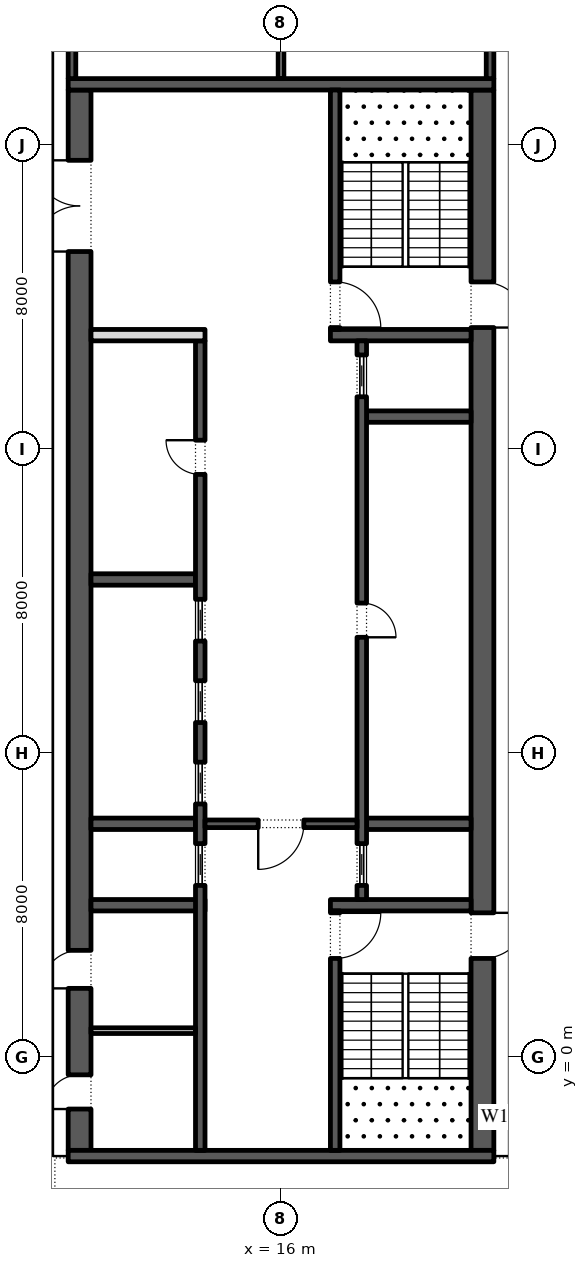
"""IFC4 building model, lengths in metres.
Left out: names, types, materials, properties, quantities, classifications, styles, units other than length and angle.
Written with IfcOpenShell. Run it as: python <this file> out.ifc"""

import sys

from ifc_helpers import new_model, si_unit, direction, frame, frame_2d, origin, place, context, subcontext, project, spatial, rectangle, extrude, element, fill, save


model = new_model("IFC4")
c1 = context("Model", 3, precision=1e-05, world=origin(), true_north=direction((0.0, 1.0)))
c2 = subcontext(c1, "Body", "Model", "MODEL_VIEW")
j1 = project(units=[si_unit("LENGTHUNIT", "METRE"), si_unit("PLANEANGLEUNIT", "RADIAN")], contexts=[c1])
p1 = place(None, origin())
s1 = spatial("IfcSite", under=j1, at=p1, CompositionType="ELEMENT")
p2 = place(p1, origin())
s2 = spatial("IfcBuilding", under=s1, at=p2, CompositionType="ELEMENT")
p3 = place(p2, frame((0.0, 0.0, 247.2)))
s3 = spatial("IfcBuildingStorey", under=s2, at=p3, CompositionType="ELEMENT", Elevation=247.2)
p4 = place(p3, frame((21.359, -11.678, 0.0), z_axis=(0.0, 0.0, 1.0), x_axis=(0.224949198343, 0.974370493275, 0.0)))
e1 = element("IfcWall", 1, at=p4, inside=s3, PredefinedType="STANDARD", context=c2, shape_type="SweptSolid", body=[
    extrude(rectangle(XDim=49.5, YDim=0.3, at=frame_2d((24.75, 0.0))), origin(), (0.0, 0.0, 1.0), 4.0),
])
p5 = place(p4, frame((1.157, 0.0, 0.45)))
e2 = element("IfcOpeningElement", 2, at=p5, cuts=e1, PredefinedType="OPENING", context=c2, shape_type="SweptSolid", body=[
    extrude(rectangle(XDim=4.5, YDim=3.05, at=frame_2d((2.25, 1.525))), frame((0.0, 0.16, 0.0), z_axis=(0.0, -1.0, 0.0), x_axis=(1.0, 0.0, 0.0)), (0.0, 0.0, 1.0), 0.32),
])
p6 = place(p4, frame((8.121, 0.0, 0.45)))
e3 = element("IfcOpeningElement", 3, at=p6, cuts=e1, PredefinedType="OPENING", context=c2, shape_type="SweptSolid", body=[
    extrude(rectangle(XDim=4.5, YDim=3.05, at=frame_2d((2.25, 1.525))), frame((0.0, 0.16, 0.0), z_axis=(0.0, -1.0, 0.0), x_axis=(1.0, 0.0, 0.0)), (0.0, 0.0, 1.0), 0.32),
])
p7 = place(p4, frame((15.236, 0.0, 0.45)))
e4 = element("IfcOpeningElement", 4, at=p7, cuts=e1, PredefinedType="OPENING", context=c2, shape_type="SweptSolid", body=[
    extrude(rectangle(XDim=4.5, YDim=3.05, at=frame_2d((2.25, 1.525))), frame((0.0, 0.16, 0.0), z_axis=(0.0, -1.0, 0.0), x_axis=(1.0, 0.0, 0.0)), (0.0, 0.0, 1.0), 0.32),
])
p8 = place(p4, frame((22.35, 0.0, 0.45)))
e5 = element("IfcOpeningElement", 5, at=p8, cuts=e1, PredefinedType="OPENING", context=c2, shape_type="SweptSolid", body=[
    extrude(rectangle(XDim=4.5, YDim=3.05, at=frame_2d((2.25, 1.525))), frame((0.0, 0.16, 0.0), z_axis=(0.0, -1.0, 0.0), x_axis=(1.0, 0.0, 0.0)), (0.0, 0.0, 1.0), 0.32),
])
p9 = place(p4, frame((29.464, 0.0, 0.45)))
e6 = element("IfcOpeningElement", 6, at=p9, cuts=e1, PredefinedType="OPENING", context=c2, shape_type="SweptSolid", body=[
    extrude(rectangle(XDim=4.5, YDim=2.95, at=frame_2d((2.25, 1.475))), frame((0.0, 0.16, 0.0), z_axis=(0.0, -1.0, 0.0), x_axis=(1.0, 0.0, 0.0)), (0.0, 0.0, 1.0), 0.32),
])
p10 = place(p4, frame((37.628, 0.0, 0.0)))
e7 = element("IfcOpeningElement", 7, at=p10, cuts=e1, PredefinedType="OPENING", context=c2, shape_type="SweptSolid", body=[
    extrude(rectangle(XDim=2.4, YDim=3.325, at=frame_2d((1.2, 1.663))), frame((0.0, 0.16, 0.0), z_axis=(0.0, -1.0, 0.0), x_axis=(1.0, 0.0, 0.0)), (0.0, 0.0, 1.0), 0.32),
])
p11 = place(p4, frame((43.693, 0.0, 0.45)))
e8 = element("IfcOpeningElement", 8, at=p11, cuts=e1, PredefinedType="OPENING", context=c2, shape_type="SweptSolid", body=[
    extrude(rectangle(XDim=4.5, YDim=3.05, at=frame_2d((2.25, 1.525))), frame((0.0, 0.16, 0.0), z_axis=(0.0, -1.0, 0.0), x_axis=(1.0, 0.0, 0.0)), (0.0, 0.0, 1.0), 0.32),
])
p12 = place(p3, frame((21.3, -2.45, 0.0), z_axis=(0.0, 0.0, 1.0), x_axis=(0.0, 1.0, 0.0)))
e9 = element("IfcWall", 9, at=p12, inside=s3, PredefinedType="SHEAR", context=c2, shape_type="SweptSolid", body=[
    extrude(rectangle(XDim=27.9, YDim=0.6, at=frame_2d((13.95, 0.0))), origin(), (0.0, 0.0, 1.0), 4.0),
])
p13 = place(p12, frame((5.05, 0.0, 0.0)))
e10 = element("IfcOpeningElement", 10, at=p13, cuts=e9, PredefinedType="OPENING", context=c2, shape_type="SweptSolid", body=[
    extrude(rectangle(XDim=1.2, YDim=2.1, at=frame_2d((0.6, 1.05))), frame((0.0, 0.31, 0.0), z_axis=(0.0, -1.0, 0.0), x_axis=(1.0, 0.0, 0.0)), (0.0, 0.0, 1.0), 0.62),
])
p14 = place(p12, frame((21.65, 0.0, 0.0)))
e11 = element("IfcOpeningElement", 11, at=p14, cuts=e9, PredefinedType="OPENING", context=c2, shape_type="SweptSolid", body=[
    extrude(rectangle(XDim=1.2, YDim=2.1, at=frame_2d((0.6, 1.05))), frame((0.0, 0.31, 0.0), z_axis=(0.0, -1.0, 0.0), x_axis=(1.0, 0.0, 0.0)), (0.0, 0.0, 1.0), 0.62),
])
p15 = place(p3, frame((10.7, -2.45, 0.0), z_axis=(0.0, 0.0, 1.0), x_axis=(0.0, 1.0, 0.0)))
e12 = element("IfcWall", 12, at=p15, inside=s3, PredefinedType="SHEAR", context=c2, shape_type="SweptSolid", body=[
    extrude(rectangle(XDim=27.9, YDim=0.6, at=frame_2d((13.95, 0.0))), origin(), (0.0, 0.0, 1.0), 4.0),
])
p16 = place(p15, frame((23.65, 0.0, 0.0)))
e13 = element("IfcOpeningElement", 13, at=p16, cuts=e12, PredefinedType="OPENING", context=c2, shape_type="SweptSolid", body=[
    extrude(rectangle(XDim=2.4, YDim=2.1, at=frame_2d((1.2, 1.05))), frame((0.0, 0.31, 0.0), z_axis=(0.0, -1.0, 0.0), x_axis=(1.0, 0.0, 0.0)), (0.0, 0.0, 1.0), 0.62),
])
p17 = place(p15, frame((1.087, 0.0, 0.0)))
e14 = element("IfcOpeningElement", 14, at=p17, cuts=e12, PredefinedType="OPENING", context=c2, shape_type="SweptSolid", body=[
    extrude(rectangle(XDim=0.9, YDim=2.1, at=frame_2d((0.45, 1.05))), frame((0.0, 0.31, 0.0), z_axis=(0.0, -1.0, 0.0), x_axis=(1.0, 0.0, 0.0)), (0.0, 0.0, 1.0), 0.62),
])
p18 = place(p15, frame((4.262, 0.0, 0.0)))
e15 = element("IfcOpeningElement", 15, at=p18, cuts=e12, PredefinedType="OPENING", context=c2, shape_type="SweptSolid", body=[
    extrude(rectangle(XDim=1.0, YDim=2.1, at=frame_2d((0.5, 1.05))), frame((0.0, 0.31, 0.0), z_axis=(0.0, -1.0, 0.0), x_axis=(1.0, 0.0, 0.0)), (0.0, 0.0, 1.0), 0.62),
])
for number, where, z_axis, x_axis in (
    (16, (10.4, -2.6, 0.0), (0.0, 0.0, 1.0), (1.0, 0.0, 0.0)),
    (17, (10.4, 25.6, 0.0), (0.0, 0.0, 1.0), (1.0, 0.0, 0.0)),
):
    element("IfcWall", number, at=place(p3, frame(where, z_axis=z_axis, x_axis=x_axis)), inside=s3, PredefinedType="SHEAR", context=c2, shape_type="SweptSolid", body=[
        extrude(rectangle(XDim=11.2, YDim=0.3, at=frame_2d((5.6, 0.0))), origin(), (0.0, 0.0, 1.0), 4.0),
    ])
p19 = place(p3, frame((17.3, 4.0, 0.0), z_axis=(0.0, 0.0, 1.0), x_axis=(1.0, 0.0, 0.0)))
e18 = element("IfcWall", 18, at=p19, inside=s3, PredefinedType="SHEAR", context=c2, shape_type="SweptSolid", body=[
    extrude(rectangle(XDim=3.7, YDim=0.3, at=frame_2d((1.85, 0.0))), origin(), (0.0, 0.0, 1.0), 4.0),
])
p20 = place(p3, frame((17.425, -2.45, 0.0), z_axis=(0.0, 0.0, 1.0), x_axis=(0.0, 1.0, 0.0)))
e19 = element("IfcWall", 19, at=p20, inside=s3, PredefinedType="SHEAR", context=c2, shape_type="SweptSolid", body=[
    extrude(rectangle(XDim=6.3, YDim=0.25, at=frame_2d((3.15, 0.0))), origin(), (0.0, 0.0, 1.0), 4.0),
])
p21 = place(p20, frame((5.05, 0.0, 0.0)))
e20 = element("IfcOpeningElement", 20, at=p21, cuts=e19, PredefinedType="OPENING", context=c2, shape_type="SweptSolid", body=[
    extrude(rectangle(XDim=1.2, YDim=2.1, at=frame_2d((0.6, 1.05))), frame((0.0, 0.135, 0.0), z_axis=(0.0, -1.0, 0.0), x_axis=(1.0, 0.0, 0.0)), (0.0, 0.0, 1.0), 0.27),
])
p22 = place(p3, frame((17.3, 19.0, 0.0), z_axis=(0.0, 0.0, 1.0), x_axis=(1.0, 0.0, 0.0)))
e21 = element("IfcWall", 21, at=p22, inside=s3, PredefinedType="SHEAR", context=c2, shape_type="SweptSolid", body=[
    extrude(rectangle(XDim=3.7, YDim=0.3, at=frame_2d((1.85, 0.0))), origin(), (0.0, 0.0, 1.0), 4.0),
])
p23 = place(p3, frame((17.425, 19.15, 0.0), z_axis=(0.0, 0.0, 1.0), x_axis=(0.0, 1.0, 0.0)))
e22 = element("IfcWall", 22, at=p23, inside=s3, PredefinedType="SHEAR", context=c2, shape_type="SweptSolid", body=[
    extrude(rectangle(XDim=6.3, YDim=0.25, at=frame_2d((3.15, 0.0))), origin(), (0.0, 0.0, 1.0), 4.0),
])
p24 = place(p23, frame((0.05, 0.0, 0.0)))
e23 = element("IfcOpeningElement", 23, at=p24, cuts=e22, PredefinedType="OPENING", context=c2, shape_type="SweptSolid", body=[
    extrude(rectangle(XDim=1.2, YDim=2.1, at=frame_2d((0.6, 1.05))), frame((0.0, 0.135, 0.0), z_axis=(0.0, -1.0, 0.0), x_axis=(1.0, 0.0, 0.0)), (0.0, 0.0, 1.0), 0.27),
])
for number, where, z_axis, x_axis in (
    (24, (18.25, 6.143, 0.0), (0.0, 0.0, 1.0), (1.0, 0.0, 0.0)),
    (25, (18.25, 16.857, 0.0), (0.0, 0.0, 1.0), (1.0, 0.0, 0.0)),
):
    element("IfcWall", number, at=place(p3, frame(where, z_axis=z_axis, x_axis=x_axis)), inside=s3, PredefinedType="SHEAR", context=c2, shape_type="SweptSolid", body=[
        extrude(rectangle(XDim=2.75, YDim=0.3, at=frame_2d((1.375, 0.0))), origin(), (0.0, 0.0, 1.0), 4.0),
    ])
p25 = place(p3, frame((18.125, 4.15, 0.0), z_axis=(0.0, 0.0, 1.0), x_axis=(0.0, 1.0, 0.0)))
e26 = element("IfcWall", 26, at=p25, inside=s3, PredefinedType="SHEAR", context=c2, shape_type="SweptSolid", body=[
    extrude(rectangle(XDim=14.7, YDim=0.25, at=frame_2d((7.35, 0.0))), origin(), (0.0, 0.0, 1.0), 4.0),
])
p26 = place(p25, frame((6.9, 0.0, 0.0)))
e27 = element("IfcOpeningElement", 27, at=p26, cuts=e26, PredefinedType="OPENING", context=c2, shape_type="SweptSolid", body=[
    extrude(rectangle(XDim=0.9, YDim=2.1, at=frame_2d((0.45, 1.05))), frame((0.0, 0.135, 0.0), z_axis=(0.0, -1.0, 0.0), x_axis=(1.0, 0.0, 0.0)), (0.0, 0.0, 1.0), 0.27),
])
p27 = place(p25, frame((0.371, 0.0, 0.0)))
e28 = element("IfcOpeningElement", 28, at=p27, cuts=e26, PredefinedType="OPENING", context=c2, shape_type="SweptSolid", body=[
    extrude(rectangle(XDim=1.1, YDim=2.1, at=frame_2d((0.55, 1.05))), frame((0.0, 0.135, 0.0), z_axis=(0.0, -1.0, 0.0), x_axis=(1.0, 0.0, 0.0)), (0.0, 0.0, 1.0), 0.27),
])
p28 = place(p25, frame((13.229, 0.0, 0.0)))
e29 = element("IfcOpeningElement", 29, at=p28, cuts=e26, PredefinedType="OPENING", context=c2, shape_type="SweptSolid", body=[
    extrude(rectangle(XDim=1.1, YDim=2.1, at=frame_2d((0.55, 1.05))), frame((0.0, 0.135, 0.0), z_axis=(0.0, -1.0, 0.0), x_axis=(1.0, 0.0, 0.0)), (0.0, 0.0, 1.0), 0.27),
])
p29 = place(p3, frame((11.0, 4.0, 0.0), z_axis=(0.0, 0.0, 1.0), x_axis=(1.0, 0.0, 0.0)))
e30 = element("IfcWall", 30, at=p29, inside=s3, PredefinedType="SHEAR", context=c2, shape_type="SweptSolid", body=[
    extrude(rectangle(XDim=3.0, YDim=0.3, at=frame_2d((1.5, 0.0))), origin(), (0.0, 0.0, 1.0), 4.0),
])
for number, where, z_axis, x_axis in (
    (31, (11.0, 6.143, 0.0), (0.0, 0.0, 1.0), (1.0, 0.0, 0.0)),
    (32, (11.0, 12.571, 0.0), (0.0, 0.0, 1.0), (1.0, 0.0, 0.0)),
):
    element("IfcWall", number, at=place(p3, frame(where, z_axis=z_axis, x_axis=x_axis)), inside=s3, PredefinedType="SHEAR", context=c2, shape_type="SweptSolid", body=[
        extrude(rectangle(XDim=2.75, YDim=0.3, at=frame_2d((1.375, 0.0))), origin(), (0.0, 0.0, 1.0), 4.0),
    ])
p30 = place(p3, frame((13.875, -2.45, 0.0), z_axis=(0.0, 0.0, 1.0), x_axis=(0.0, 1.0, 0.0)))
e33 = element("IfcWall", 33, at=p30, inside=s3, PredefinedType="SHEAR", context=c2, shape_type="SweptSolid", body=[
    extrude(rectangle(XDim=21.3, YDim=0.25, at=frame_2d((10.65, 0.0))), origin(), (0.0, 0.0, 1.0), 4.0),
])
p31 = place(p30, frame((17.786, 0.0, 0.0)))
e34 = element("IfcOpeningElement", 34, at=p31, cuts=e33, PredefinedType="OPENING", context=c2, shape_type="SweptSolid", body=[
    extrude(rectangle(XDim=0.9, YDim=2.1, at=frame_2d((0.45, 1.05))), frame((0.0, 0.135, 0.0), z_axis=(0.0, -1.0, 0.0), x_axis=(1.0, 0.0, 0.0)), (0.0, 0.0, 1.0), 0.27),
])
p32 = place(p30, frame((6.971, 0.0, 0.0)))
e35 = element("IfcOpeningElement", 35, at=p32, cuts=e33, PredefinedType="OPENING", context=c2, shape_type="SweptSolid", body=[
    extrude(rectangle(XDim=1.1, YDim=2.1, at=frame_2d((0.55, 1.05))), frame((0.0, 0.135, 0.0), z_axis=(0.0, -1.0, 0.0), x_axis=(1.0, 0.0, 0.0)), (0.0, 0.0, 1.0), 0.27),
])
p33 = place(p30, frame((9.114, 0.0, 0.0)))
e36 = element("IfcOpeningElement", 36, at=p33, cuts=e33, PredefinedType="OPENING", context=c2, shape_type="SweptSolid", body=[
    extrude(rectangle(XDim=1.1, YDim=2.1, at=frame_2d((0.55, 1.05))), frame((0.0, 0.135, 0.0), z_axis=(0.0, -1.0, 0.0), x_axis=(1.0, 0.0, 0.0)), (0.0, 0.0, 1.0), 0.27),
])
p34 = place(p30, frame((11.257, 0.0, 0.0)))
e37 = element("IfcOpeningElement", 37, at=p34, cuts=e33, PredefinedType="OPENING", context=c2, shape_type="SweptSolid", body=[
    extrude(rectangle(XDim=1.1, YDim=2.1, at=frame_2d((0.55, 1.05))), frame((0.0, 0.135, 0.0), z_axis=(0.0, -1.0, 0.0), x_axis=(1.0, 0.0, 0.0)), (0.0, 0.0, 1.0), 0.27),
])
p35 = place(p30, frame((13.4, 0.0, 0.0)))
e38 = element("IfcOpeningElement", 38, at=p35, cuts=e33, PredefinedType="OPENING", context=c2, shape_type="SweptSolid", body=[
    extrude(rectangle(XDim=1.1, YDim=2.1, at=frame_2d((0.55, 1.05))), frame((0.0, 0.135, 0.0), z_axis=(0.0, -1.0, 0.0), x_axis=(1.0, 0.0, 0.0)), (0.0, 0.0, 1.0), 0.27),
])
p36 = place(p3, frame((11.0, 19.0, 0.0), z_axis=(0.0, 0.0, 1.0), x_axis=(1.0, 0.0, 0.0)))
e39 = element("IfcWall", 39, at=p36, inside=s3, PredefinedType="PARTITIONING", context=c2, shape_type="SweptSolid", body=[
    extrude(rectangle(XDim=3.0, YDim=0.3, at=frame_2d((1.5, 0.0))), origin(), (0.0, 0.0, 1.0), 4.0),
])
p37 = place(p3, frame((14.0, 6.143, 0.0), z_axis=(0.0, 0.0, 1.0), x_axis=(1.0, 0.0, 0.0)))
e40 = element("IfcWall", 40, at=p37, inside=s3, PredefinedType="SHEAR", context=c2, shape_type="SweptSolid", body=[
    extrude(rectangle(XDim=4.0, YDim=0.2, at=frame_2d((2.0, 0.0))), origin(), (0.0, 0.0, 1.0), 4.0),
])
p38 = place(p37, frame((1.4, 0.0, 0.0)))
e41 = element("IfcOpeningElement", 41, at=p38, cuts=e40, PredefinedType="OPENING", context=c2, shape_type="SweptSolid", body=[
    extrude(rectangle(XDim=1.2, YDim=2.1, at=frame_2d((0.6, 1.05))), frame((0.0, 0.11, 0.0), z_axis=(0.0, -1.0, 0.0), x_axis=(1.0, 0.0, 0.0)), (0.0, 0.0, 1.0), 0.22),
])
p39 = place(p3, frame((11.0, 0.7, 0.0), z_axis=(0.0, 0.0, 1.0), x_axis=(1.0, 0.0, 0.0)))
e42 = element("IfcWall", 42, at=p39, inside=s3, PredefinedType="PARTITIONING", context=c2, shape_type="SweptSolid", body=[
    extrude(rectangle(XDim=2.75, YDim=0.15, at=frame_2d((1.375, 0.0))), origin(), (0.0, 0.0, 1.0), 4.0),
])
p40 = place(p3, frame((21.5, 25.75, 0.0), z_axis=(0.0, 0.0, 1.0), x_axis=(0.0, 1.0, 0.0)))
e43 = element("IfcWall", 43, at=p40, inside=s3, PredefinedType="SHEAR", context=c2, shape_type="SweptSolid", body=[
    extrude(rectangle(XDim=4.75, YDim=0.2, at=frame_2d((2.375, 0.0))), origin(), (0.0, 0.0, 1.0), 4.0),
])
p41 = place(p40, frame((1.925, 0.0, 0.0)))
e44 = element("IfcOpeningElement", 44, at=p41, cuts=e43, PredefinedType="OPENING", context=c2, shape_type="SweptSolid", body=[
    extrude(rectangle(XDim=0.9, YDim=2.1, at=frame_2d((0.45, 1.05))), frame((0.0, 0.11, 0.0), z_axis=(0.0, -1.0, 0.0), x_axis=(1.0, 0.0, 0.0)), (0.0, 0.0, 1.0), 0.22),
])
p42 = place(p3, frame((10.5, 25.75, 0.0), z_axis=(0.0, 0.0, 1.0), x_axis=(0.0, 1.0, 0.0)))
e45 = element("IfcWall", 45, at=p42, inside=s3, PredefinedType="SHEAR", context=c2, shape_type="SweptSolid", body=[
    extrude(rectangle(XDim=4.75, YDim=0.2, at=frame_2d((2.375, 0.0))), origin(), (0.0, 0.0, 1.0), 4.0),
])
p43 = place(p42, frame((1.925, 0.0, 0.0)))
e46 = element("IfcOpeningElement", 46, at=p43, cuts=e45, PredefinedType="OPENING", context=c2, shape_type="SweptSolid", body=[
    extrude(rectangle(XDim=0.9, YDim=2.1, at=frame_2d((0.45, 1.05))), frame((0.0, 0.11, 0.0), z_axis=(0.0, -1.0, 0.0), x_axis=(1.0, 0.0, 0.0)), (0.0, 0.0, 1.0), 0.22),
])
p44 = place(p3, frame((16.0, 25.75, 0.0), z_axis=(0.0, 0.0, 1.0), x_axis=(0.0, 1.0, 0.0)))
e47 = element("IfcWall", 47, at=p44, inside=s3, PredefinedType="PARTITIONING", context=c2, shape_type="SweptSolid", body=[
    extrude(rectangle(XDim=4.75, YDim=0.15, at=frame_2d((2.375, 0.0))), origin(), (0.0, 0.0, 1.0), 4.0),
])
p45 = place(p26, frame((0.9, -0.2, 0.0), z_axis=(0.0, 0.0, 1.0), x_axis=(-1.0, 0.0, 0.0)))
e48 = element("IfcDoor", 48, at=p45, inside=s3, OperationType="SINGLE_SWING_LEFT", PredefinedType="DOOR", context=c2, shape_type="SweptSolid", body=[
    extrude(rectangle(XDim=0.9, YDim=2.1, at=frame_2d((0.45, 1.05))), frame((0.0, -0.075, 0.0), z_axis=(0.0, -1.0, 0.0), x_axis=(1.0, 0.0, 0.0)), (0.0, 0.0, 1.0), 0.05),
])
fill(e27, e48)
p46 = place(p27, origin())
e49 = element("IfcDoor", 49, at=p46, inside=s3, OperationType="SLIDING_TO_LEFT", PredefinedType="DOOR", context=c2, shape_type="SweptSolid", body=[
    extrude(rectangle(XDim=1.1, YDim=2.1, at=frame_2d((0.55, 1.05))), frame((0.0, 0.025, 0.0), z_axis=(0.0, -1.0, 0.0), x_axis=(1.0, 0.0, 0.0)), (0.0, 0.0, 1.0), 0.05),
])
fill(e28, e49)
p47 = place(p28, origin())
e50 = element("IfcDoor", 50, at=p47, inside=s3, OperationType="SLIDING_TO_LEFT", PredefinedType="DOOR", context=c2, shape_type="SweptSolid", body=[
    extrude(rectangle(XDim=1.1, YDim=2.1, at=frame_2d((0.55, 1.05))), frame((0.0, 0.025, 0.0), z_axis=(0.0, -1.0, 0.0), x_axis=(1.0, 0.0, 0.0)), (0.0, 0.0, 1.0), 0.05),
])
fill(e29, e50)
p48 = place(p31, origin())
e51 = element("IfcDoor", 51, at=p48, inside=s3, OperationType="SINGLE_SWING_LEFT", PredefinedType="DOOR", context=c2, shape_type="SweptSolid", body=[
    extrude(rectangle(XDim=0.9, YDim=2.1, at=frame_2d((0.45, 1.05))), frame((0.0, 0.125, 0.0), z_axis=(0.0, -1.0, 0.0), x_axis=(1.0, 0.0, 0.0)), (0.0, 0.0, 1.0), 0.05),
])
fill(e34, e51)
p49 = place(p32, origin())
e52 = element("IfcDoor", 52, at=p49, inside=s3, OperationType="SLIDING_TO_LEFT", PredefinedType="DOOR", context=c2, shape_type="SweptSolid", body=[
    extrude(rectangle(XDim=1.1, YDim=2.1, at=frame_2d((0.55, 1.05))), frame((0.0, 0.025, 0.0), z_axis=(0.0, -1.0, 0.0), x_axis=(1.0, 0.0, 0.0)), (0.0, 0.0, 1.0), 0.05),
])
fill(e35, e52)
p50 = place(p33, origin())
e53 = element("IfcDoor", 53, at=p50, inside=s3, OperationType="SLIDING_TO_LEFT", PredefinedType="DOOR", context=c2, shape_type="SweptSolid", body=[
    extrude(rectangle(XDim=1.1, YDim=2.1, at=frame_2d((0.55, 1.05))), frame((0.0, 0.025, 0.0), z_axis=(0.0, -1.0, 0.0), x_axis=(1.0, 0.0, 0.0)), (0.0, 0.0, 1.0), 0.05),
])
fill(e36, e53)
p51 = place(p34, origin())
e54 = element("IfcDoor", 54, at=p51, inside=s3, OperationType="SLIDING_TO_LEFT", PredefinedType="DOOR", context=c2, shape_type="SweptSolid", body=[
    extrude(rectangle(XDim=1.1, YDim=2.1, at=frame_2d((0.55, 1.05))), frame((0.0, 0.025, 0.0), z_axis=(0.0, -1.0, 0.0), x_axis=(1.0, 0.0, 0.0)), (0.0, 0.0, 1.0), 0.05),
])
fill(e37, e54)
p52 = place(p35, origin())
e55 = element("IfcDoor", 55, at=p52, inside=s3, OperationType="SLIDING_TO_LEFT", PredefinedType="DOOR", context=c2, shape_type="SweptSolid", body=[
    extrude(rectangle(XDim=1.1, YDim=2.1, at=frame_2d((0.55, 1.05))), frame((0.0, 0.025, 0.0), z_axis=(0.0, -1.0, 0.0), x_axis=(1.0, 0.0, 0.0)), (0.0, 0.0, 1.0), 0.05),
])
fill(e38, e55)
p53 = place(p38, frame((1.2, 0.0, 0.0), z_axis=(0.0, 0.0, 1.0), x_axis=(-1.0, 0.0, 0.0)))
e56 = element("IfcDoor", 56, at=p53, inside=s3, OperationType="SINGLE_SWING_LEFT", PredefinedType="DOOR", context=c2, shape_type="SweptSolid", body=[
    extrude(rectangle(XDim=1.2, YDim=2.1, at=frame_2d((0.6, 1.05))), frame((0.0, 0.025, 0.0), z_axis=(0.0, -1.0, 0.0), x_axis=(1.0, 0.0, 0.0)), (0.0, 0.0, 1.0), 0.05),
])
fill(e41, e56)
p54 = place(p16, origin())
e57 = element("IfcDoor", 57, at=p54, inside=s3, OperationType="DOUBLE_DOOR_SINGLE_SWING", PredefinedType="DOOR", context=c2, shape_type="SweptSolid", body=[
    extrude(rectangle(XDim=2.4, YDim=2.1, at=frame_2d((1.2, 1.05))), frame((0.0, 0.025, 0.0), z_axis=(0.0, -1.0, 0.0), x_axis=(1.0, 0.0, 0.0)), (0.0, 0.0, 1.0), 0.05),
])
fill(e13, e57)
p55 = place(p21, frame((1.2, 0.0, 0.0), z_axis=(0.0, 0.0, 1.0), x_axis=(-1.0, 0.0, 0.0)))
e58 = element("IfcDoor", 58, at=p55, inside=s3, OperationType="SINGLE_SWING_RIGHT", PredefinedType="DOOR", context=c2, shape_type="SweptSolid", body=[
    extrude(rectangle(XDim=1.2, YDim=2.1, at=frame_2d((0.6, 1.05))), frame((0.0, 0.025, 0.0), z_axis=(0.0, -1.0, 0.0), x_axis=(1.0, 0.0, 0.0)), (0.0, 0.0, 1.0), 0.05),
])
fill(e20, e58)
p56 = place(p13, frame((1.2, 0.0, 0.0), z_axis=(0.0, 0.0, 1.0), x_axis=(-1.0, 0.0, 0.0)))
e59 = element("IfcDoor", 59, at=p56, inside=s3, OperationType="SINGLE_SWING_RIGHT", PredefinedType="DOOR", context=c2, shape_type="SweptSolid", body=[
    extrude(rectangle(XDim=1.2, YDim=2.1, at=frame_2d((0.6, 1.05))), frame((0.0, 0.025, 0.0), z_axis=(0.0, -1.0, 0.0), x_axis=(1.0, 0.0, 0.0)), (0.0, 0.0, 1.0), 0.05),
])
fill(e10, e59)
p57 = place(p24, frame((1.2, 0.0, 0.0), z_axis=(0.0, 0.0, 1.0), x_axis=(-1.0, 0.0, 0.0)))
e60 = element("IfcDoor", 60, at=p57, inside=s3, OperationType="SINGLE_SWING_LEFT", PredefinedType="DOOR", context=c2, shape_type="SweptSolid", body=[
    extrude(rectangle(XDim=1.2, YDim=2.1, at=frame_2d((0.6, 1.05))), frame((0.0, 0.025, 0.0), z_axis=(0.0, -1.0, 0.0), x_axis=(1.0, 0.0, 0.0)), (0.0, 0.0, 1.0), 0.05),
])
fill(e23, e60)
p58 = place(p14, frame((1.2, 0.0, 0.0), z_axis=(0.0, 0.0, 1.0), x_axis=(-1.0, 0.0, 0.0)))
e61 = element("IfcDoor", 61, at=p58, inside=s3, OperationType="SINGLE_SWING_LEFT", PredefinedType="DOOR", context=c2, shape_type="SweptSolid", body=[
    extrude(rectangle(XDim=1.2, YDim=2.1, at=frame_2d((0.6, 1.05))), frame((0.0, 0.025, 0.0), z_axis=(0.0, -1.0, 0.0), x_axis=(1.0, 0.0, 0.0)), (0.0, 0.0, 1.0), 0.05),
])
fill(e11, e61)
p59 = place(p17, origin())
e62 = element("IfcDoor", 62, at=p59, inside=s3, OperationType="SINGLE_SWING_RIGHT", PredefinedType="DOOR", context=c2, shape_type="SweptSolid", body=[
    extrude(rectangle(XDim=0.9, YDim=2.1, at=frame_2d((0.45, 1.05))), frame((0.0, -0.25, 0.0), z_axis=(0.0, -1.0, 0.0), x_axis=(1.0, 0.0, 0.0)), (0.0, 0.0, 1.0), 0.05),
])
fill(e14, e62)
p60 = place(p18, origin())
e63 = element("IfcDoor", 63, at=p60, inside=s3, OperationType="SINGLE_SWING_RIGHT", PredefinedType="DOOR", context=c2, shape_type="SweptSolid", body=[
    extrude(rectangle(XDim=1.0, YDim=2.1, at=frame_2d((0.5, 1.05))), frame((0.0, -0.25, 0.0), z_axis=(0.0, -1.0, 0.0), x_axis=(1.0, 0.0, 0.0)), (0.0, 0.0, 1.0), 0.05),
])
fill(e15, e63)
save(model, sys.argv[1])
